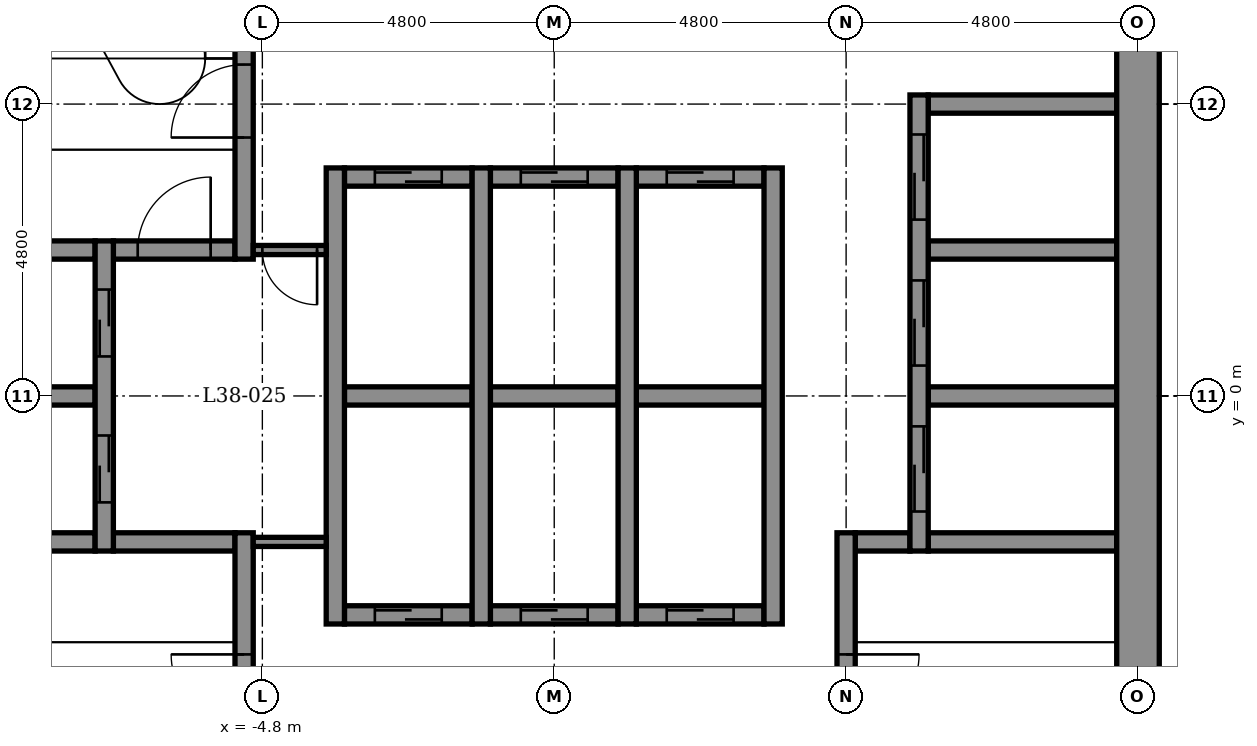
"""IFC4 building model, lengths in metres.
Left out: names, types, materials, properties, quantities, classifications, styles, units other than length and angle.
Written with IfcOpenShell. Run it as: python <this file> out.ifc"""

import sys

from ifc_helpers import new_model, si_unit, direction, frame, frame_2d, origin, place, context, subcontext, project, spatial, rectangle, extrude, element, fill, save


model = new_model("IFC4")
c1 = context("Model", 3, precision=1e-05, world=origin(), true_north=direction((0.0, 1.0)))
c2 = subcontext(c1, "Body", "Model", "MODEL_VIEW")
j1 = project(units=[si_unit("LENGTHUNIT", "METRE"), si_unit("PLANEANGLEUNIT", "RADIAN")], contexts=[c1])
p1 = place(None, origin())
s1 = spatial("IfcSite", under=j1, at=p1, CompositionType="ELEMENT")
p2 = place(p1, origin())
s2 = spatial("IfcBuilding", under=s1, at=p2, CompositionType="ELEMENT")
p3 = place(p2, frame((0.0, 0.0, 181.7)))
s3 = spatial("IfcBuildingStorey", under=s2, at=p3, CompositionType="ELEMENT", Elevation=181.7)
p4 = place(p3, frame((-3.45, -3.6, -0.15), z_axis=(0.0, 0.0, 1.0), x_axis=(1.0, 0.0, 0.0)))
e1 = element("IfcWall", 1, at=p4, inside=s3, PredefinedType="STANDARD", context=c2, shape_type="SweptSolid", body=[
    extrude(rectangle(XDim=2.1, YDim=0.3, at=frame_2d((1.05, 0.0))), origin(), (0.0, 0.0, 1.0), 3.9),
])
p5 = place(p4, frame((0.5, 0.0, 0.15)))
e2 = element("IfcOpeningElement", 2, at=p5, cuts=e1, PredefinedType="OPENING", context=c2, shape_type="SweptSolid", body=[
    extrude(rectangle(XDim=1.1, YDim=2.1, at=frame_2d((0.55, 1.05))), frame((0.0, 0.16, 0.0), z_axis=(0.0, -1.0, 0.0), x_axis=(1.0, 0.0, 0.0)), (0.0, 0.0, 1.0), 0.32),
])
p6 = place(p3, frame((-1.05, -3.6, -0.15), z_axis=(0.0, 0.0, 1.0), x_axis=(1.0, 0.0, 0.0)))
e3 = element("IfcWall", 3, at=p6, inside=s3, PredefinedType="STANDARD", context=c2, shape_type="SweptSolid", body=[
    extrude(rectangle(XDim=2.1, YDim=0.3, at=frame_2d((1.05, 0.0))), origin(), (0.0, 0.0, 1.0), 3.9),
])
p7 = place(p6, frame((0.5, 0.0, 0.15)))
e4 = element("IfcOpeningElement", 4, at=p7, cuts=e3, PredefinedType="OPENING", context=c2, shape_type="SweptSolid", body=[
    extrude(rectangle(XDim=1.1, YDim=2.1, at=frame_2d((0.55, 1.05))), frame((0.0, 0.16, 0.0), z_axis=(0.0, -1.0, 0.0), x_axis=(1.0, 0.0, 0.0)), (0.0, 0.0, 1.0), 0.32),
])
p8 = place(p3, frame((1.35, -3.6, -0.15), z_axis=(0.0, 0.0, 1.0), x_axis=(1.0, 0.0, 0.0)))
e5 = element("IfcWall", 5, at=p8, inside=s3, PredefinedType="STANDARD", context=c2, shape_type="SweptSolid", body=[
    extrude(rectangle(XDim=2.1, YDim=0.3, at=frame_2d((1.05, 0.0))), origin(), (0.0, 0.0, 1.0), 3.9),
])
p9 = place(p8, frame((0.5, 0.0, 0.15)))
e6 = element("IfcOpeningElement", 6, at=p9, cuts=e5, PredefinedType="OPENING", context=c2, shape_type="SweptSolid", body=[
    extrude(rectangle(XDim=1.1, YDim=2.1, at=frame_2d((0.55, 1.05))), frame((0.0, 0.16, 0.0), z_axis=(0.0, -1.0, 0.0), x_axis=(1.0, 0.0, 0.0)), (0.0, 0.0, 1.0), 0.32),
])
p10 = place(p3, frame((-9.45, -2.4, -0.15), z_axis=(0.0, 0.0, 1.0), x_axis=(1.0, 0.0, 0.0)))
e7 = element("IfcWall", 7, at=p10, inside=s3, PredefinedType="STANDARD", context=c2, shape_type="SweptSolid", body=[
    extrude(rectangle(XDim=1.9, YDim=0.3, at=frame_2d((0.95, 0.0))), origin(), (0.0, 0.0, 1.0), 3.9),
])
p11 = place(p3, frame((-7.25, -2.4, -0.15), z_axis=(0.0, 0.0, 1.0), x_axis=(1.0, 0.0, 0.0)))
e8 = element("IfcWall", 8, at=p11, inside=s3, PredefinedType="STANDARD", context=c2, shape_type="SweptSolid", body=[
    extrude(rectangle(XDim=2.0, YDim=0.3, at=frame_2d((1.0, 0.0))), origin(), (0.0, 0.0, 1.0), 3.9),
])
p12 = place(p3, frame((4.95, -2.4, -0.15), z_axis=(0.0, 0.0, 1.0), x_axis=(1.0, 0.0, 0.0)))
e9 = element("IfcWall", 9, at=p12, inside=s3, PredefinedType="STANDARD", context=c2, shape_type="SweptSolid", body=[
    extrude(rectangle(XDim=0.9, YDim=0.3, at=frame_2d((0.45, 0.0))), origin(), (0.0, 0.0, 1.0), 3.9),
])
p13 = place(p3, frame((6.15, -2.4, -0.15), z_axis=(0.0, 0.0, 1.0), x_axis=(1.0, 0.0, 0.0)))
e10 = element("IfcWall", 10, at=p13, inside=s3, PredefinedType="STANDARD", context=c2, shape_type="SweptSolid", body=[
    extrude(rectangle(XDim=3.1, YDim=0.3, at=frame_2d((1.55, 0.0))), origin(), (0.0, 0.0, 1.0), 3.9),
])
p14 = place(p3, frame((-10.85, 0.0, -0.15), z_axis=(0.0, 0.0, 1.0), x_axis=(1.0, 0.0, 0.0)))
e11 = element("IfcWall", 11, at=p14, inside=s3, PredefinedType="STANDARD", context=c2, shape_type="SweptSolid", body=[
    extrude(rectangle(XDim=3.3, YDim=0.3, at=frame_2d((1.65, 0.0))), origin(), (0.0, 0.0, 1.0), 3.9),
])
p15 = place(p3, frame((-3.45, 0.0, -0.15), z_axis=(0.0, 0.0, 1.0), x_axis=(1.0, 0.0, 0.0)))
e12 = element("IfcWall", 12, at=p15, inside=s3, PredefinedType="STANDARD", context=c2, shape_type="SweptSolid", body=[
    extrude(rectangle(XDim=2.1, YDim=0.3, at=frame_2d((1.05, 0.0))), origin(), (0.0, 0.0, 1.0), 3.9),
])
p16 = place(p3, frame((-1.05, 0.0, -0.15), z_axis=(0.0, 0.0, 1.0), x_axis=(1.0, 0.0, 0.0)))
e13 = element("IfcWall", 13, at=p16, inside=s3, PredefinedType="STANDARD", context=c2, shape_type="SweptSolid", body=[
    extrude(rectangle(XDim=2.1, YDim=0.3, at=frame_2d((1.05, 0.0))), origin(), (0.0, 0.0, 1.0), 3.9),
])
p17 = place(p3, frame((1.35, 0.0, -0.15), z_axis=(0.0, 0.0, 1.0), x_axis=(1.0, 0.0, 0.0)))
e14 = element("IfcWall", 14, at=p17, inside=s3, PredefinedType="STANDARD", context=c2, shape_type="SweptSolid", body=[
    extrude(rectangle(XDim=2.1, YDim=0.3, at=frame_2d((1.05, 0.0))), origin(), (0.0, 0.0, 1.0), 3.9),
])
p18 = place(p3, frame((6.15, 0.0, -0.15), z_axis=(0.0, 0.0, 1.0), x_axis=(1.0, 0.0, 0.0)))
e15 = element("IfcWall", 15, at=p18, inside=s3, PredefinedType="STANDARD", context=c2, shape_type="SweptSolid", body=[
    extrude(rectangle(XDim=3.1, YDim=0.3, at=frame_2d((1.55, 0.0))), origin(), (0.0, 0.0, 1.0), 3.9),
])
p19 = place(p3, frame((-9.45, 2.4, -0.15), z_axis=(0.0, 0.0, 1.0), x_axis=(1.0, 0.0, 0.0)))
e16 = element("IfcWall", 16, at=p19, inside=s3, PredefinedType="STANDARD", context=c2, shape_type="SweptSolid", body=[
    extrude(rectangle(XDim=1.9, YDim=0.3, at=frame_2d((0.95, 0.0))), origin(), (0.0, 0.0, 1.0), 3.9),
])
p20 = place(p3, frame((-7.25, 2.4, -0.15), z_axis=(0.0, 0.0, 1.0), x_axis=(1.0, 0.0, 0.0)))
e17 = element("IfcWall", 17, at=p20, inside=s3, PredefinedType="STANDARD", context=c2, shape_type="SweptSolid", body=[
    extrude(rectangle(XDim=2.0, YDim=0.3, at=frame_2d((1.0, 0.0))), origin(), (0.0, 0.0, 1.0), 3.9),
])
p21 = place(p20, frame((0.4, 0.0, 0.15)))
e18 = element("IfcOpeningElement", 18, at=p21, cuts=e17, PredefinedType="OPENING", context=c2, shape_type="SweptSolid", body=[
    extrude(rectangle(XDim=1.2, YDim=2.1, at=frame_2d((0.6, 1.05))), frame((0.0, 0.16, 0.0), z_axis=(0.0, -1.0, 0.0), x_axis=(1.0, 0.0, 0.0)), (0.0, 0.0, 1.0), 0.32),
])
p22 = place(p3, frame((6.15, 2.4, -0.15), z_axis=(0.0, 0.0, 1.0), x_axis=(1.0, 0.0, 0.0)))
e19 = element("IfcWall", 19, at=p22, inside=s3, PredefinedType="STANDARD", context=c2, shape_type="SweptSolid", body=[
    extrude(rectangle(XDim=3.1, YDim=0.3, at=frame_2d((1.55, 0.0))), origin(), (0.0, 0.0, 1.0), 3.9),
])
p23 = place(p3, frame((-3.45, 3.6, -0.15), z_axis=(0.0, 0.0, 1.0), x_axis=(1.0, 0.0, 0.0)))
e20 = element("IfcWall", 20, at=p23, inside=s3, PredefinedType="STANDARD", context=c2, shape_type="SweptSolid", body=[
    extrude(rectangle(XDim=2.1, YDim=0.3, at=frame_2d((1.05, 0.0))), origin(), (0.0, 0.0, 1.0), 3.9),
])
p24 = place(p23, frame((0.5, 0.0, 0.15)))
e21 = element("IfcOpeningElement", 21, at=p24, cuts=e20, PredefinedType="OPENING", context=c2, shape_type="SweptSolid", body=[
    extrude(rectangle(XDim=1.1, YDim=2.1, at=frame_2d((0.55, 1.05))), frame((0.0, 0.16, 0.0), z_axis=(0.0, -1.0, 0.0), x_axis=(1.0, 0.0, 0.0)), (0.0, 0.0, 1.0), 0.32),
])
p25 = place(p3, frame((-1.05, 3.6, -0.15), z_axis=(0.0, 0.0, 1.0), x_axis=(1.0, 0.0, 0.0)))
e22 = element("IfcWall", 22, at=p25, inside=s3, PredefinedType="STANDARD", context=c2, shape_type="SweptSolid", body=[
    extrude(rectangle(XDim=2.1, YDim=0.3, at=frame_2d((1.05, 0.0))), origin(), (0.0, 0.0, 1.0), 3.9),
])
p26 = place(p25, frame((0.5, 0.0, 0.15)))
e23 = element("IfcOpeningElement", 23, at=p26, cuts=e22, PredefinedType="OPENING", context=c2, shape_type="SweptSolid", body=[
    extrude(rectangle(XDim=1.1, YDim=2.1, at=frame_2d((0.55, 1.05))), frame((0.0, 0.16, 0.0), z_axis=(0.0, -1.0, 0.0), x_axis=(1.0, 0.0, 0.0)), (0.0, 0.0, 1.0), 0.32),
])
p27 = place(p3, frame((1.35, 3.6, -0.15), z_axis=(0.0, 0.0, 1.0), x_axis=(1.0, 0.0, 0.0)))
e24 = element("IfcWall", 24, at=p27, inside=s3, PredefinedType="STANDARD", context=c2, shape_type="SweptSolid", body=[
    extrude(rectangle(XDim=2.1, YDim=0.3, at=frame_2d((1.05, 0.0))), origin(), (0.0, 0.0, 1.0), 3.9),
])
p28 = place(p27, frame((0.5, 0.0, 0.15)))
e25 = element("IfcOpeningElement", 25, at=p28, cuts=e24, PredefinedType="OPENING", context=c2, shape_type="SweptSolid", body=[
    extrude(rectangle(XDim=1.1, YDim=2.1, at=frame_2d((0.55, 1.05))), frame((0.0, 0.16, 0.0), z_axis=(0.0, -1.0, 0.0), x_axis=(1.0, 0.0, 0.0)), (0.0, 0.0, 1.0), 0.32),
])
p29 = place(p3, frame((6.15, 4.8, -0.15), z_axis=(0.0, 0.0, 1.0), x_axis=(1.0, 0.0, 0.0)))
e26 = element("IfcWall", 26, at=p29, inside=s3, PredefinedType="STANDARD", context=c2, shape_type="SweptSolid", body=[
    extrude(rectangle(XDim=3.1, YDim=0.3, at=frame_2d((1.55, 0.0))), origin(), (0.0, 0.0, 1.0), 3.9),
])
p30 = place(p3, frame((-7.4, -2.55, -0.15), z_axis=(0.0, 0.0, 1.0), x_axis=(0.0, 1.0, 0.0)))
e27 = element("IfcWall", 27, at=p30, inside=s3, PredefinedType="STANDARD", context=c2, shape_type="SweptSolid", body=[
    extrude(rectangle(XDim=5.1, YDim=0.3, at=frame_2d((2.55, 0.0))), origin(), (0.0, 0.0, 1.0), 3.9),
])
p31 = place(p30, frame((0.8, 0.0, 0.15)))
e28 = element("IfcOpeningElement", 28, at=p31, cuts=e27, PredefinedType="OPENING", context=c2, shape_type="SweptSolid", body=[
    extrude(rectangle(XDim=1.1, YDim=2.1, at=frame_2d((0.55, 1.05))), frame((0.0, 0.16, 0.0), z_axis=(0.0, -1.0, 0.0), x_axis=(1.0, 0.0, 0.0)), (0.0, 0.0, 1.0), 0.32),
])
p32 = place(p30, frame((3.2, 0.0, 0.15)))
e29 = element("IfcOpeningElement", 29, at=p32, cuts=e27, PredefinedType="OPENING", context=c2, shape_type="SweptSolid", body=[
    extrude(rectangle(XDim=1.1, YDim=2.1, at=frame_2d((0.55, 1.05))), frame((0.0, 0.16, 0.0), z_axis=(0.0, -1.0, 0.0), x_axis=(1.0, 0.0, 0.0)), (0.0, 0.0, 1.0), 0.32),
])
p33 = place(p3, frame((-5.1, -9.25, -0.15), z_axis=(0.0, 0.0, 1.0), x_axis=(0.0, 1.0, 0.0)))
e30 = element("IfcWall", 30, at=p33, inside=s3, PredefinedType="STANDARD", context=c2, shape_type="SweptSolid", body=[
    extrude(rectangle(XDim=7.0, YDim=0.3, at=frame_2d((3.5, 0.0))), origin(), (0.0, 0.0, 1.0), 3.9),
])
p34 = place(p33, frame((3.8, 0.0, 0.15)))
e31 = element("IfcOpeningElement", 31, at=p34, cuts=e30, PredefinedType="OPENING", context=c2, shape_type="SweptSolid", body=[
    extrude(rectangle(XDim=1.2, YDim=2.1, at=frame_2d((0.6, 1.05))), frame((0.0, 0.16, 0.0), z_axis=(0.0, -1.0, 0.0), x_axis=(1.0, 0.0, 0.0)), (0.0, 0.0, 1.0), 0.32),
])
p35 = place(p3, frame((-5.1, 2.25, -0.15), z_axis=(0.0, 0.0, 1.0), x_axis=(0.0, 1.0, 0.0)))
e32 = element("IfcWall", 32, at=p35, inside=s3, PredefinedType="STANDARD", context=c2, shape_type="SweptSolid", body=[
    extrude(rectangle(XDim=7.0, YDim=0.3, at=frame_2d((3.5, 0.0))), origin(), (0.0, 0.0, 1.0), 3.9),
])
p36 = place(p35, frame((2.0, 0.0, 0.15)))
e33 = element("IfcOpeningElement", 33, at=p36, cuts=e32, PredefinedType="OPENING", context=c2, shape_type="SweptSolid", body=[
    extrude(rectangle(XDim=1.2, YDim=2.1, at=frame_2d((0.6, 1.05))), frame((0.0, 0.16, 0.0), z_axis=(0.0, -1.0, 0.0), x_axis=(1.0, 0.0, 0.0)), (0.0, 0.0, 1.0), 0.32),
])
for number, where, z_axis, x_axis in (
    (34, (-3.6, -3.75, -0.15), (0.0, 0.0, 1.0), (0.0, 1.0, 0.0)),
    (35, (-1.2, -3.75, -0.15), (0.0, 0.0, 1.0), (0.0, 1.0, 0.0)),
    (36, (1.2, -3.75, -0.15), (0.0, 0.0, 1.0), (0.0, 1.0, 0.0)),
    (37, (3.6, -3.75, -0.15), (0.0, 0.0, 1.0), (0.0, 1.0, 0.0)),
):
    element("IfcWall", number, at=place(p3, frame(where, z_axis=z_axis, x_axis=x_axis)), inside=s3, PredefinedType="STANDARD", context=c2, shape_type="SweptSolid", body=[
        extrude(rectangle(XDim=7.5, YDim=0.3, at=frame_2d((3.75, 0.0))), origin(), (0.0, 0.0, 1.0), 3.9),
    ])
p37 = place(p3, frame((4.8, -9.25, -0.15), z_axis=(0.0, 0.0, 1.0), x_axis=(0.0, 1.0, 0.0)))
e38 = element("IfcWall", 38, at=p37, inside=s3, PredefinedType="STANDARD", context=c2, shape_type="SweptSolid", body=[
    extrude(rectangle(XDim=7.0, YDim=0.3, at=frame_2d((3.5, 0.0))), origin(), (0.0, 0.0, 1.0), 3.9),
])
p38 = place(p37, frame((3.8, 0.0, 0.15)))
e39 = element("IfcOpeningElement", 39, at=p38, cuts=e38, PredefinedType="OPENING", context=c2, shape_type="SweptSolid", body=[
    extrude(rectangle(XDim=1.2, YDim=2.1, at=frame_2d((0.6, 1.05))), frame((0.0, 0.16, 0.0), z_axis=(0.0, -1.0, 0.0), x_axis=(1.0, 0.0, 0.0)), (0.0, 0.0, 1.0), 0.32),
])
p39 = place(p3, frame((6.0, -2.55, -0.15), z_axis=(0.0, 0.0, 1.0), x_axis=(0.0, 1.0, 0.0)))
e40 = element("IfcWall", 40, at=p39, inside=s3, PredefinedType="STANDARD", context=c2, shape_type="SweptSolid", body=[
    extrude(rectangle(XDim=7.5, YDim=0.3, at=frame_2d((3.75, 0.0))), origin(), (0.0, 0.0, 1.0), 3.9),
])
p40 = place(p39, frame((0.65, 0.0, 0.15)))
e41 = element("IfcOpeningElement", 41, at=p40, cuts=e40, PredefinedType="OPENING", context=c2, shape_type="SweptSolid", body=[
    extrude(rectangle(XDim=1.4, YDim=2.1, at=frame_2d((0.7, 1.05))), frame((0.0, 0.16, 0.0), z_axis=(0.0, -1.0, 0.0), x_axis=(1.0, 0.0, 0.0)), (0.0, 0.0, 1.0), 0.32),
])
p41 = place(p39, frame((3.05, 0.0, 0.15)))
e42 = element("IfcOpeningElement", 42, at=p41, cuts=e40, PredefinedType="OPENING", context=c2, shape_type="SweptSolid", body=[
    extrude(rectangle(XDim=1.4, YDim=2.1, at=frame_2d((0.7, 1.05))), frame((0.0, 0.16, 0.0), z_axis=(0.0, -1.0, 0.0), x_axis=(1.0, 0.0, 0.0)), (0.0, 0.0, 1.0), 0.32),
])
p42 = place(p39, frame((5.45, 0.0, 0.15)))
e43 = element("IfcOpeningElement", 43, at=p42, cuts=e40, PredefinedType="OPENING", context=c2, shape_type="SweptSolid", body=[
    extrude(rectangle(XDim=1.4, YDim=2.1, at=frame_2d((0.7, 1.05))), frame((0.0, 0.16, 0.0), z_axis=(0.0, -1.0, 0.0), x_axis=(1.0, 0.0, 0.0)), (0.0, 0.0, 1.0), 0.32),
])
p43 = place(p3, frame((9.6, -10.15, -0.15), z_axis=(0.0, 0.0, 1.0), x_axis=(0.0, 1.0, 0.0)))
e44 = element("IfcWall", 44, at=p43, inside=s3, PredefinedType="SHEAR", context=c2, shape_type="SweptSolid", body=[
    extrude(rectangle(XDim=20.1, YDim=0.7, at=frame_2d((10.05, 0.0))), origin(), (0.0, 0.0, 1.0), 3.9),
])
p44 = place(p3, frame((-4.95, 2.4, 0.0), z_axis=(0.0, 0.0, 1.0), x_axis=(1.0, 0.0, 0.0)))
e45 = element("IfcWall", 45, at=p44, inside=s3, PredefinedType="PARTITIONING", context=c2, shape_type="SweptSolid", body=[
    extrude(rectangle(XDim=1.2, YDim=0.15, at=frame_2d((0.6, 0.0))), origin(), (0.0, 0.0, 1.0), 3.75),
])
p45 = place(p44, frame((0.15, 0.0, 0.0)))
e46 = element("IfcOpeningElement", 46, at=p45, cuts=e45, PredefinedType="OPENING", context=c2, shape_type="SweptSolid", body=[
    extrude(rectangle(XDim=0.9, YDim=2.1, at=frame_2d((0.45, 1.05))), frame((0.0, 0.085, 0.0), z_axis=(0.0, -1.0, 0.0), x_axis=(1.0, 0.0, 0.0)), (0.0, 0.0, 1.0), 0.17),
])
p46 = place(p3, frame((-4.95, -2.4, 0.0), z_axis=(0.0, 0.0, 1.0), x_axis=(1.0, 0.0, 0.0)))
e47 = element("IfcWall", 47, at=p46, inside=s3, PredefinedType="PARTITIONING", context=c2, shape_type="SweptSolid", body=[
    extrude(rectangle(XDim=1.2, YDim=0.15, at=frame_2d((0.6, 0.0))), origin(), (0.0, 0.0, 1.0), 3.75),
])
p47 = place(p31, origin())
e48 = element("IfcDoor", 48, at=p47, inside=s3, OperationType="DOUBLE_DOOR_SLIDING", PredefinedType="DOOR", context=c2, shape_type="SweptSolid", body=[
    extrude(rectangle(XDim=1.1, YDim=2.1, at=frame_2d((0.55, 1.05))), frame((0.0, 0.025, 0.0), z_axis=(0.0, -1.0, 0.0), x_axis=(1.0, 0.0, 0.0)), (0.0, 0.0, 1.0), 0.05),
])
fill(e28, e48)
p48 = place(p32, origin())
e49 = element("IfcDoor", 49, at=p48, inside=s3, OperationType="DOUBLE_DOOR_SLIDING", PredefinedType="DOOR", context=c2, shape_type="SweptSolid", body=[
    extrude(rectangle(XDim=1.1, YDim=2.1, at=frame_2d((0.55, 1.05))), frame((0.0, 0.025, 0.0), z_axis=(0.0, -1.0, 0.0), x_axis=(1.0, 0.0, 0.0)), (0.0, 0.0, 1.0), 0.05),
])
fill(e29, e49)
p49 = place(p40, origin())
e50 = element("IfcDoor", 50, at=p49, inside=s3, OperationType="DOUBLE_DOOR_SLIDING", PredefinedType="DOOR", context=c2, shape_type="SweptSolid", body=[
    extrude(rectangle(XDim=1.4, YDim=2.1, at=frame_2d((0.7, 1.05))), frame((0.0, 0.025, 0.0), z_axis=(0.0, -1.0, 0.0), x_axis=(1.0, 0.0, 0.0)), (0.0, 0.0, 1.0), 0.05),
])
fill(e41, e50)
p50 = place(p41, origin())
e51 = element("IfcDoor", 51, at=p50, inside=s3, OperationType="DOUBLE_DOOR_SLIDING", PredefinedType="DOOR", context=c2, shape_type="SweptSolid", body=[
    extrude(rectangle(XDim=1.4, YDim=2.1, at=frame_2d((0.7, 1.05))), frame((0.0, 0.025, 0.0), z_axis=(0.0, -1.0, 0.0), x_axis=(1.0, 0.0, 0.0)), (0.0, 0.0, 1.0), 0.05),
])
fill(e42, e51)
p51 = place(p42, origin())
e52 = element("IfcDoor", 52, at=p51, inside=s3, OperationType="DOUBLE_DOOR_SLIDING", PredefinedType="DOOR", context=c2, shape_type="SweptSolid", body=[
    extrude(rectangle(XDim=1.4, YDim=2.1, at=frame_2d((0.7, 1.05))), frame((0.0, 0.025, 0.0), z_axis=(0.0, -1.0, 0.0), x_axis=(1.0, 0.0, 0.0)), (0.0, 0.0, 1.0), 0.05),
])
fill(e43, e52)
p52 = place(p24, origin())
e53 = element("IfcDoor", 53, at=p52, inside=s3, OperationType="DOUBLE_DOOR_SLIDING", PredefinedType="DOOR", context=c2, shape_type="SweptSolid", body=[
    extrude(rectangle(XDim=1.1, YDim=2.1, at=frame_2d((0.55, 1.05))), frame((0.0, 0.025, 0.0), z_axis=(0.0, -1.0, 0.0), x_axis=(1.0, 0.0, 0.0)), (0.0, 0.0, 1.0), 0.05),
])
fill(e21, e53)
p53 = place(p26, origin())
e54 = element("IfcDoor", 54, at=p53, inside=s3, OperationType="DOUBLE_DOOR_SLIDING", PredefinedType="DOOR", context=c2, shape_type="SweptSolid", body=[
    extrude(rectangle(XDim=1.1, YDim=2.1, at=frame_2d((0.55, 1.05))), frame((0.0, 0.025, 0.0), z_axis=(0.0, -1.0, 0.0), x_axis=(1.0, 0.0, 0.0)), (0.0, 0.0, 1.0), 0.05),
])
fill(e23, e54)
p54 = place(p28, origin())
e55 = element("IfcDoor", 55, at=p54, inside=s3, OperationType="DOUBLE_DOOR_SLIDING", PredefinedType="DOOR", context=c2, shape_type="SweptSolid", body=[
    extrude(rectangle(XDim=1.1, YDim=2.1, at=frame_2d((0.55, 1.05))), frame((0.0, 0.025, 0.0), z_axis=(0.0, -1.0, 0.0), x_axis=(1.0, 0.0, 0.0)), (0.0, 0.0, 1.0), 0.05),
])
fill(e25, e55)
p55 = place(p5, origin())
e56 = element("IfcDoor", 56, at=p55, inside=s3, OperationType="DOUBLE_DOOR_SLIDING", PredefinedType="DOOR", context=c2, shape_type="SweptSolid", body=[
    extrude(rectangle(XDim=1.1, YDim=2.1, at=frame_2d((0.55, 1.05))), frame((0.0, 0.025, 0.0), z_axis=(0.0, -1.0, 0.0), x_axis=(1.0, 0.0, 0.0)), (0.0, 0.0, 1.0), 0.05),
])
fill(e2, e56)
p56 = place(p7, origin())
e57 = element("IfcDoor", 57, at=p56, inside=s3, OperationType="DOUBLE_DOOR_SLIDING", PredefinedType="DOOR", context=c2, shape_type="SweptSolid", body=[
    extrude(rectangle(XDim=1.1, YDim=2.1, at=frame_2d((0.55, 1.05))), frame((0.0, 0.025, 0.0), z_axis=(0.0, -1.0, 0.0), x_axis=(1.0, 0.0, 0.0)), (0.0, 0.0, 1.0), 0.05),
])
fill(e4, e57)
p57 = place(p9, origin())
e58 = element("IfcDoor", 58, at=p57, inside=s3, OperationType="DOUBLE_DOOR_SLIDING", PredefinedType="DOOR", context=c2, shape_type="SweptSolid", body=[
    extrude(rectangle(XDim=1.1, YDim=2.1, at=frame_2d((0.55, 1.05))), frame((0.0, 0.025, 0.0), z_axis=(0.0, -1.0, 0.0), x_axis=(1.0, 0.0, 0.0)), (0.0, 0.0, 1.0), 0.05),
])
fill(e6, e58)
p58 = place(p36, origin())
e59 = element("IfcDoor", 59, at=p58, inside=s3, OperationType="SINGLE_SWING_LEFT", PredefinedType="DOOR", context=c2, shape_type="SweptSolid", body=[
    extrude(rectangle(XDim=1.2, YDim=2.1, at=frame_2d((0.6, 1.05))), frame((0.0, 0.025, 0.0), z_axis=(0.0, -1.0, 0.0), x_axis=(1.0, 0.0, 0.0)), (0.0, 0.0, 1.0), 0.05),
])
fill(e33, e59)
p59 = place(p34, origin())
e60 = element("IfcDoor", 60, at=p59, inside=s3, OperationType="SINGLE_SWING_RIGHT", PredefinedType="DOOR", context=c2, shape_type="SweptSolid", body=[
    extrude(rectangle(XDim=1.2, YDim=2.1, at=frame_2d((0.6, 1.05))), frame((0.0, 0.025, 0.0), z_axis=(0.0, -1.0, 0.0), x_axis=(1.0, 0.0, 0.0)), (0.0, 0.0, 1.0), 0.05),
])
fill(e31, e60)
p60 = place(p38, frame((1.2, 0.0, 0.0), z_axis=(0.0, 0.0, 1.0), x_axis=(-1.0, 0.0, 0.0)))
e61 = element("IfcDoor", 61, at=p60, inside=s3, OperationType="SINGLE_SWING_RIGHT", PredefinedType="DOOR", context=c2, shape_type="SweptSolid", body=[
    extrude(rectangle(XDim=1.2, YDim=2.1, at=frame_2d((0.6, 1.05))), frame((0.0, 0.025, 0.0), z_axis=(0.0, -1.0, 0.0), x_axis=(1.0, 0.0, 0.0)), (0.0, 0.0, 1.0), 0.05),
])
fill(e39, e61)
p61 = place(p45, frame((0.9, 0.0, 0.0), z_axis=(0.0, 0.0, 1.0), x_axis=(-1.0, 0.0, 0.0)))
e62 = element("IfcDoor", 62, at=p61, inside=s3, OperationType="SINGLE_SWING_RIGHT", PredefinedType="DOOR", context=c2, shape_type="SweptSolid", body=[
    extrude(rectangle(XDim=0.9, YDim=2.1, at=frame_2d((0.45, 1.05))), frame((0.0, 0.025, 0.0), z_axis=(0.0, -1.0, 0.0), x_axis=(1.0, 0.0, 0.0)), (0.0, 0.0, 1.0), 0.05),
])
fill(e46, e62)
p62 = place(p21, origin())
e63 = element("IfcDoor", 63, at=p62, inside=s3, OperationType="SINGLE_SWING_RIGHT", PredefinedType="DOOR", context=c2, shape_type="SweptSolid", body=[
    extrude(rectangle(XDim=1.2, YDim=2.1, at=frame_2d((0.6, 1.05))), frame((0.0, 0.025, 0.0), z_axis=(0.0, -1.0, 0.0), x_axis=(1.0, 0.0, 0.0)), (0.0, 0.0, 1.0), 0.05),
])
fill(e18, e63)
save(model, sys.argv[1])
